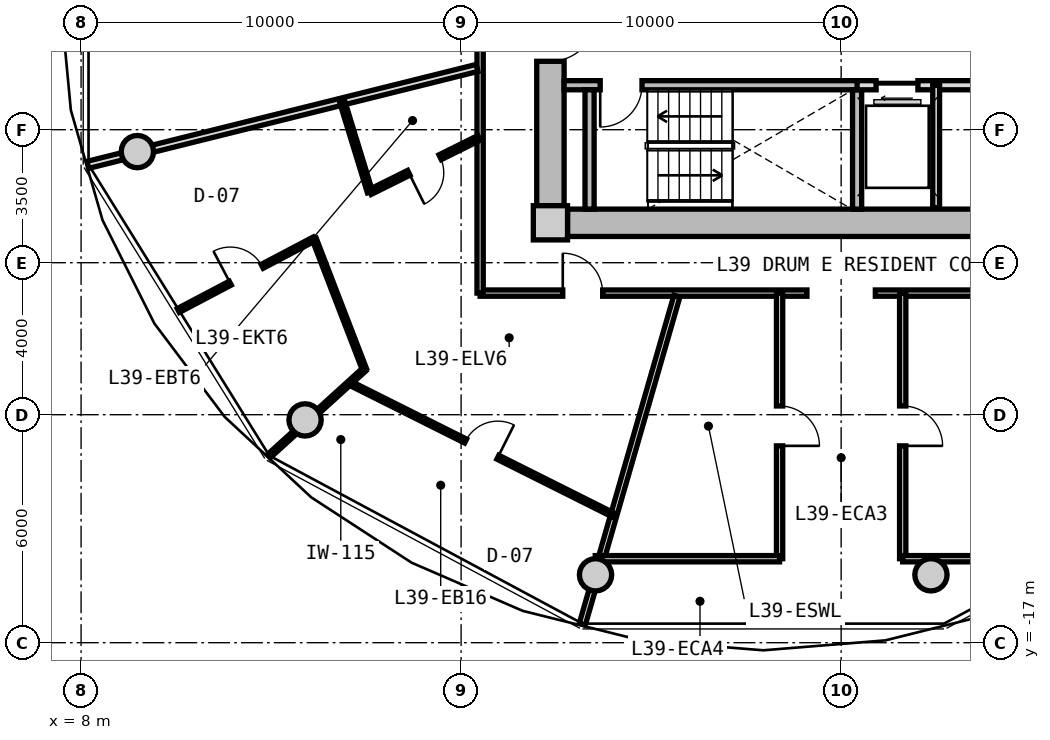
"""IFC4 building model, lengths in metres.
Left out: names, types, materials, properties, quantities, classifications, styles, units other than length and angle.
Written with IfcOpenShell. Run it as: python <this file> out.ifc"""

import sys

from ifc_helpers import new_model, si_unit, direction, frame, frame_2d, origin, origin_2d, place, context, subcontext, project, spatial, rectangle, circle, extrude, source, transform, mapped, element, fill, save


model = new_model("IFC4")
c1 = context("Model", 3, precision=1e-05, world=origin(), true_north=direction((0.0, 1.0)))
c2 = subcontext(c1, "Body", "Model", "MODEL_VIEW")
j1 = project(units=[si_unit("LENGTHUNIT", "METRE"), si_unit("PLANEANGLEUNIT", "RADIAN")], contexts=[c1])
p1 = place(None, origin())
s1 = spatial("IfcSite", under=j1, at=p1, CompositionType="ELEMENT")
p2 = place(p1, origin())
s2 = spatial("IfcBuilding", under=s1, at=p2, CompositionType="ELEMENT")
p3 = place(p2, frame((0.0, 0.0, 126.75)))
s3 = spatial("IfcBuildingStorey", under=s2, at=p3, CompositionType="ELEMENT", Elevation=126.75)
m1 = source(origin(), c2, "Body", "SweptSolid", [
    extrude(rectangle(XDim=0.9, YDim=0.9, at=origin_2d()), origin(), (0.0, 0.0, 1.0), 3.05),
])
p4 = place(p3, frame((20.35, -5.95, 0.0), z_axis=(0.0, 0.0, 1.0), x_axis=(1.0, 0.0, 0.0)))
e1 = element("IfcColumn", 1, at=p4, inside=s3, PredefinedType="COLUMN", context=c2, shape_type="MappedRepresentation", body=[
    mapped(m1, transform((0.0, 0.0, 0.0), x_axis=(1.0, 0.0, 0.0), y_axis=(0.0, 1.0, 0.0), z_axis=(0.0, 0.0, 1.0), scale=1.0)),
])
m2 = source(origin(), c2, "Body", "SweptSolid", [
    extrude(rectangle(XDim=14.4, YDim=0.72, at=frame_2d((7.2, 0.0))), origin(), (0.0, 0.0, 1.0), 2.73),
])
p5 = place(p3, frame((35.2, -5.95, 0.0), z_axis=(0.0, 0.0, 1.0), x_axis=(-1.0, 0.0, 0.0)))
e2 = element("IfcWall", 2, at=p5, inside=s3, PredefinedType="SHEAR", context=c2, shape_type="MappedRepresentation", body=[
    mapped(m2, transform((0.0, 0.0, 0.0), x_axis=(1.0, 0.0, 0.0), y_axis=(0.0, 1.0, 0.0), z_axis=(0.0, 0.0, 1.0), scale=1.0)),
])
m3 = source(origin(), c2, "Body", "SweptSolid", [
    extrude(rectangle(XDim=11.0, YDim=0.72, at=frame_2d((5.5, 0.0))), origin(), (0.0, 0.0, 1.0), 2.73),
])
p6 = place(p3, frame((20.35, -5.5, 0.0), z_axis=(0.0, 0.0, 1.0), x_axis=(0.0, 1.0, 0.0)))
e3 = element("IfcWall", 3, at=p6, inside=s3, PredefinedType="SHEAR", context=c2, shape_type="MappedRepresentation", body=[
    mapped(m3, transform((0.0, 0.0, 0.0), x_axis=(1.0, 0.0, 0.0), y_axis=(0.0, 1.0, 0.0), z_axis=(0.0, 0.0, 1.0), scale=1.0)),
])
p7 = place(p6, frame((3.8, 0.0, 0.0)))
e4 = element("IfcOpeningElement", 4, at=p7, cuts=e3, PredefinedType="OPENING", context=c2, shape_type="SweptSolid", body=[
    extrude(rectangle(XDim=1.2, YDim=2.15, at=frame_2d((0.6, 1.075))), frame((0.0, 0.37, 0.0), z_axis=(0.0, -1.0, 0.0), x_axis=(1.0, 0.0, 0.0)), (0.0, 0.0, 1.0), 0.74),
])
m4 = source(origin(), c2, "Body", "SweptSolid", [
    extrude(circle(Radius=0.425, at=origin_2d()), origin(), (0.0, 0.0, 1.0), 3.05),
])
for number, where, z_axis, x_axis in (
    (5, (9.481, -4.076, 0.0), (0.0, 0.0, 1.0), (1.0, 0.0, 0.0)),
    (6, (13.894, -11.137, 0.0), (0.0, 0.0, 1.0), (1.0, 0.0, 0.0)),
    (7, (21.537, -15.213, 0.0), (0.0, 0.0, 1.0), (1.0, 0.0, 0.0)),
    (8, (30.363, -15.213, 0.0), (0.0, 0.0, 1.0), (1.0, 0.0, 0.0)),
):
    element("IfcColumn", number, at=place(p3, frame(where, z_axis=z_axis, x_axis=x_axis)), inside=s3, PredefinedType="COLUMN", context=c2, shape_type="MappedRepresentation", body=[
        mapped(m4, transform((0.0, 0.0, 0.0), x_axis=(1.0, 0.0, 0.0), y_axis=(0.0, 1.0, 0.0), z_axis=(0.0, 0.0, 1.0), scale=1.0)),
    ])
m5 = source(origin(), c2, "Body", "SweptSolid", [
    extrude(rectangle(XDim=7.83, YDim=0.24, at=frame_2d((3.915, 0.0))), origin(), (0.0, 0.0, 1.0), 2.73),
])
p8 = place(p3, frame((20.71, -2.33, 0.0), z_axis=(0.0, 0.0, 1.0), x_axis=(1.0, 0.0, 0.0)))
e9 = element("IfcWall", 9, at=p8, inside=s3, PredefinedType="PARTITIONING", context=c2, shape_type="MappedRepresentation", body=[
    mapped(m5, transform((0.0, 0.0, 0.0), x_axis=(1.0, 0.0, 0.0), y_axis=(0.0, 1.0, 0.0), z_axis=(0.0, 0.0, 1.0), scale=1.0)),
])
p9 = place(p8, frame((0.95, 0.0, 0.0)))
e10 = element("IfcOpeningElement", 10, at=p9, cuts=e9, PredefinedType="OPENING", context=c2, shape_type="SweptSolid", body=[
    extrude(rectangle(XDim=1.1, YDim=2.15, at=frame_2d((0.55, 1.075))), frame((0.0, 0.13, 0.0), z_axis=(0.0, -1.0, 0.0), x_axis=(1.0, 0.0, 0.0)), (0.0, 0.0, 1.0), 0.26),
])
m6 = source(origin(), c2, "Body", "SweptSolid", [
    extrude(rectangle(XDim=3.14, YDim=0.24, at=frame_2d((1.57, 0.0))), origin(), (0.0, 0.0, 1.0), 2.73),
])
for number, where, z_axis, x_axis in (
    (11, (21.38, -5.59, 0.0), (0.0, 0.0, 1.0), (0.0, 1.0, 0.0)),
    (12, (28.42, -5.59, 0.0), (0.0, 0.0, 1.0), (0.0, 1.0, 0.0)),
):
    element("IfcWall", number, at=place(p3, frame(where, z_axis=z_axis, x_axis=x_axis)), inside=s3, PredefinedType="PARTITIONING", context=c2, shape_type="MappedRepresentation", body=[
        mapped(m6, transform((0.0, 0.0, 0.0), x_axis=(1.0, 0.0, 0.0), y_axis=(0.0, 1.0, 0.0), z_axis=(0.0, 0.0, 1.0), scale=1.0)),
    ])
m7 = source(origin(), c2, "Body", "SweptSolid", [
    extrude(rectangle(XDim=4.13, YDim=0.24, at=frame_2d((2.065, 0.0))), origin(), (0.0, 0.0, 1.0), 2.715),
])
p10 = place(p3, frame((28.42, -2.33, 0.0), z_axis=(0.0, 0.0, 1.0), x_axis=(1.0, 0.0, 0.0)))
e13 = element("IfcWall", 13, at=p10, inside=s3, PredefinedType="PARTITIONING", context=c2, shape_type="MappedRepresentation", body=[
    mapped(m7, transform((0.0, 0.0, 0.0), x_axis=(1.0, 0.0, 0.0), y_axis=(0.0, 1.0, 0.0), z_axis=(0.0, 0.0, 1.0), scale=1.0)),
])
p11 = place(p10, frame((0.5, 0.0, 0.0)))
e14 = element("IfcOpeningElement", 14, at=p11, cuts=e13, PredefinedType="OPENING", context=c2, shape_type="SweptSolid", body=[
    extrude(rectangle(XDim=1.1, YDim=2.2, at=frame_2d((0.55, 1.1))), frame((0.0, 0.13, 0.0), z_axis=(0.0, -1.0, 0.0), x_axis=(1.0, 0.0, 0.0)), (0.0, 0.0, 1.0), 0.26),
])
m8 = source(origin(), c2, "Body", "SweptSolid", [
    extrude(rectangle(XDim=3.22, YDim=0.18, at=frame_2d((1.61, 0.0))), origin(), (0.0, 0.0, 1.0), 2.715),
])
p12 = place(p3, frame((30.5, -5.55, 0.0), z_axis=(0.0, 0.0, 1.0), x_axis=(0.0, 1.0, 0.0)))
e15 = element("IfcWall", 15, at=p12, inside=s3, PredefinedType="PARTITIONING", context=c2, shape_type="MappedRepresentation", body=[
    mapped(m8, transform((0.0, 0.0, 0.0), x_axis=(1.0, 0.0, 0.0), y_axis=(0.0, 1.0, 0.0), z_axis=(0.0, 0.0, 1.0), scale=1.0)),
])
m9 = source(origin(), c2, "Body", "SweptSolid", [
    extrude(rectangle(XDim=8.6, YDim=0.165, at=frame_2d((4.3, 0.0))), origin(), (0.0, 0.0, 1.0), 2.715),
])
p13 = place(p3, frame((37.5, -7.8, 0.0), z_axis=(0.0, 0.0, 1.0), x_axis=(-1.0, 0.0, 0.0)))
e16 = element("IfcWall", 16, at=p13, inside=s3, PredefinedType="PARTITIONING", context=c2, shape_type="MappedRepresentation", body=[
    mapped(m9, transform((0.0, 0.0, 0.0), x_axis=(1.0, 0.0, 0.0), y_axis=(0.0, 1.0, 0.0), z_axis=(0.0, 0.0, 1.0), scale=1.0)),
])
p14 = place(p3, frame((27.1, -7.8, 0.0), z_axis=(0.0, 0.0, 1.0), x_axis=(-1.0, 0.0, 0.0)))
e17 = element("IfcWall", 17, at=p14, inside=s3, PredefinedType="PARTITIONING", context=c2, shape_type="MappedRepresentation", body=[
    mapped(m9, transform((0.0, 0.0, 0.0), x_axis=(1.0, 0.0, 0.0), y_axis=(0.0, 1.0, 0.0), z_axis=(0.0, 0.0, 1.0), scale=1.0)),
])
p15 = place(p14, frame((5.375, 0.0, 0.0)))
e18 = element("IfcOpeningElement", 18, at=p15, cuts=e17, PredefinedType="OPENING", context=c2, shape_type="SweptSolid", body=[
    extrude(rectangle(XDim=1.05, YDim=2.15, at=frame_2d((0.525, 1.075))), frame((0.0, 0.093, 0.0), z_axis=(0.0, -1.0, 0.0), x_axis=(1.0, 0.0, 0.0)), (0.0, 0.0, 1.0), 0.185),
])
m10 = source(origin(), c2, "Body", "SweptSolid", [
    extrude(rectangle(XDim=15.6, YDim=0.165, at=frame_2d((7.8, 0.0))), origin(), (0.0, 0.0, 1.0), 2.715),
])
p16 = place(p3, frame((18.5, -7.8, 0.0), z_axis=(0.0, 0.0, 1.0), x_axis=(0.0, 1.0, 0.0)))
e19 = element("IfcWall", 19, at=p16, inside=s3, PredefinedType="PARTITIONING", context=c2, shape_type="MappedRepresentation", body=[
    mapped(m10, transform((0.0, 0.0, 0.0), x_axis=(1.0, 0.0, 0.0), y_axis=(0.0, 1.0, 0.0), z_axis=(0.0, 0.0, 1.0), scale=1.0)),
])
p17 = place(p16, frame((10.383, 0.0, 0.0)))
e20 = element("IfcOpeningElement", 20, at=p17, cuts=e19, PredefinedType="OPENING", context=c2, shape_type="SweptSolid", body=[
    extrude(rectangle(XDim=1.05, YDim=2.15, at=frame_2d((0.525, 1.075))), frame((0.0, 0.093, 0.0), z_axis=(0.0, -1.0, 0.0), x_axis=(1.0, 0.0, 0.0)), (0.0, 0.0, 1.0), 0.185),
])
p18 = place(p16, frame((6.419, 0.0, 0.0)))
e21 = element("IfcOpeningElement", 21, at=p18, cuts=e19, PredefinedType="OPENING", context=c2, shape_type="SweptSolid", body=[
    extrude(rectangle(XDim=1.05, YDim=2.15, at=frame_2d((0.525, 1.075))), frame((0.0, 0.093, 0.0), z_axis=(0.0, -1.0, 0.0), x_axis=(1.0, 0.0, 0.0)), (0.0, 0.0, 1.0), 0.185),
])
m11 = source(origin(), c2, "Body", "SweptSolid", [
    extrude(rectangle(XDim=8.989, YDim=0.165, at=frame_2d((4.495, 0.0))), origin(), (0.0, 0.0, 1.0), 2.215),
])
p19 = place(p3, frame((23.678, -7.88, 0.0), z_axis=(0.0, 0.0, 1.0), x_axis=(-0.27702323008, -0.960863221274, 0.0)))
e22 = element("IfcWall", 22, at=p19, inside=s3, PredefinedType="PARTITIONING", context=c2, shape_type="MappedRepresentation", body=[
    mapped(m11, transform((0.0, 0.0, 0.0), x_axis=(1.0, 0.0, 0.0), y_axis=(0.0, 1.0, 0.0), z_axis=(0.0, 0.0, 1.0), scale=1.0)),
])
m12 = source(origin(), c2, "Body", "SweptSolid", [
    extrude(rectangle(XDim=6.99, YDim=0.165, at=frame_2d((3.495, 0.0))), origin(), (0.0, 0.0, 1.0), 2.715),
])
p20 = place(p3, frame((26.38, -14.79, 0.0), z_axis=(0.0, 0.0, 1.0), x_axis=(0.0, 1.0, 0.0)))
e23 = element("IfcWall", 23, at=p20, inside=s3, PredefinedType="PARTITIONING", context=c2, shape_type="MappedRepresentation", body=[
    mapped(m12, transform((0.0, 0.0, 0.0), x_axis=(1.0, 0.0, 0.0), y_axis=(0.0, 1.0, 0.0), z_axis=(0.0, 0.0, 1.0), scale=1.0)),
])
p21 = place(p20, frame((2.97, 0.0, 0.0)))
e24 = element("IfcOpeningElement", 24, at=p21, cuts=e23, PredefinedType="OPENING", context=c2, shape_type="SweptSolid", body=[
    extrude(rectangle(XDim=1.05, YDim=2.15, at=frame_2d((0.525, 1.075))), frame((0.0, 0.093, 0.0), z_axis=(0.0, -1.0, 0.0), x_axis=(1.0, 0.0, 0.0)), (0.0, 0.0, 1.0), 0.185),
])
m13 = source(origin(), c2, "Body", "SweptSolid", [
    extrude(rectangle(XDim=4.851, YDim=0.165, at=frame_2d((2.425, 0.0))), origin(), (0.0, 0.0, 1.0), 2.715),
])
p22 = place(p3, frame((21.529, -14.79, 0.0), z_axis=(0.0, 0.0, 1.0), x_axis=(1.0, 0.0, 0.0)))
e25 = element("IfcWall", 25, at=p22, inside=s3, PredefinedType="PARTITIONING", context=c2, shape_type="MappedRepresentation", body=[
    mapped(m13, transform((0.0, 0.0, 0.0), x_axis=(1.0, 0.0, 0.0), y_axis=(0.0, 1.0, 0.0), z_axis=(0.0, 0.0, 1.0), scale=1.0)),
])
m14 = source(origin(), c2, "Body", "SweptSolid", [
    extrude(rectangle(XDim=6.99, YDim=0.165, at=frame_2d((3.495, 0.0))), origin(), (0.0, 0.0, 1.0), 2.215),
])
p23 = place(p3, frame((29.62, -14.79, 0.0), z_axis=(0.0, 0.0, 1.0), x_axis=(0.0, 1.0, 0.0)))
e26 = element("IfcWall", 26, at=p23, inside=s3, PredefinedType="PARTITIONING", context=c2, shape_type="MappedRepresentation", body=[
    mapped(m14, transform((0.0, 0.0, 0.0), x_axis=(1.0, 0.0, 0.0), y_axis=(0.0, 1.0, 0.0), z_axis=(0.0, 0.0, 1.0), scale=1.0)),
])
p24 = place(p23, frame((2.97, 0.0, 0.0)))
e27 = element("IfcOpeningElement", 27, at=p24, cuts=e26, PredefinedType="OPENING", context=c2, shape_type="SweptSolid", body=[
    extrude(rectangle(XDim=1.05, YDim=2.15, at=frame_2d((0.525, 1.075))), frame((0.0, 0.093, 0.0), z_axis=(0.0, -1.0, 0.0), x_axis=(1.0, 0.0, 0.0)), (0.0, 0.0, 1.0), 0.185),
])
m15 = source(origin(), c2, "Body", "SweptSolid", [
    extrude(rectangle(XDim=4.569, YDim=0.165, at=frame_2d((2.285, 0.0))), origin(), (0.0, 0.0, 1.0), 2.715),
])
p25 = place(p3, frame((29.62, -14.79, 0.0), z_axis=(0.0, 0.0, 1.0), x_axis=(1.0, 0.0, 0.0)))
e28 = element("IfcWall", 28, at=p25, inside=s3, PredefinedType="PARTITIONING", context=c2, shape_type="MappedRepresentation", body=[
    mapped(m15, transform((0.0, 0.0, 0.0), x_axis=(1.0, 0.0, 0.0), y_axis=(0.0, 1.0, 0.0), z_axis=(0.0, 0.0, 1.0), scale=1.0)),
])
m16 = source(origin(), c2, "Body", "SweptSolid", [
    extrude(rectangle(XDim=10.556, YDim=0.19, at=frame_2d((5.278, 0.0))), origin(), (0.0, 0.0, 1.0), 2.215),
])
p26 = place(p3, frame((18.42, -1.875, 0.0), z_axis=(0.0, 0.0, 1.0), x_axis=(-0.970363857851, -0.241648470667, 0.0)))
e29 = element("IfcWall", 29, at=p26, inside=s3, PredefinedType="PARTITIONING", context=c2, shape_type="MappedRepresentation", body=[
    mapped(m16, transform((0.0, 0.0, 0.0), x_axis=(1.0, 0.0, 0.0), y_axis=(0.0, 1.0, 0.0), z_axis=(0.0, 0.0, 1.0), scale=1.0)),
])
m17 = source(origin(), c2, "Body", "SweptSolid", [
    extrude(rectangle(XDim=7.767, YDim=0.115, at=frame_2d((3.884, 0.0))), origin(), (0.0, 0.0, 1.0), 2.715),
])
p27 = place(p3, frame((15.07, -10.167, 0.0), z_axis=(0.0, 0.0, 1.0), x_axis=(0.894188177352, -0.447691303783, 0.0)))
e30 = element("IfcWall", 30, at=p27, inside=s3, PredefinedType="PARTITIONING", context=c2, shape_type="MappedRepresentation", body=[
    mapped(m17, transform((0.0, 0.0, 0.0), x_axis=(1.0, 0.0, 0.0), y_axis=(0.0, 1.0, 0.0), z_axis=(0.0, 0.0, 1.0), scale=1.0)),
])
p28 = place(p27, frame((3.409, 0.0, 0.0)))
e31 = element("IfcOpeningElement", 31, at=p28, cuts=e30, PredefinedType="OPENING", context=c2, shape_type="SweptSolid", body=[
    extrude(rectangle(XDim=0.95, YDim=2.1, at=frame_2d((0.475, 1.05))), frame((0.0, 0.067, 0.0), z_axis=(0.0, -1.0, 0.0), x_axis=(1.0, 0.0, 0.0)), (0.0, 0.0, 1.0), 0.135),
])
m18 = source(origin(), c2, "Body", "SweptSolid", [
    extrude(rectangle(XDim=3.393, YDim=0.115, at=frame_2d((1.696, 0.0))), origin(), (0.0, 0.0, 1.0), 2.215),
])
p29 = place(p3, frame((15.451, -9.811, 0.0), z_axis=(0.0, 0.0, 1.0), x_axis=(-0.740356690907, -0.672214229416, 0.0)))
e32 = element("IfcWall", 32, at=p29, inside=s3, PredefinedType="PARTITIONING", context=c2, shape_type="MappedRepresentation", body=[
    mapped(m18, transform((0.0, 0.0, 0.0), x_axis=(1.0, 0.0, 0.0), y_axis=(0.0, 1.0, 0.0), z_axis=(0.0, 0.0, 1.0), scale=1.0)),
])
m19 = source(origin(), c2, "Body", "SweptSolid", [
    extrude(rectangle(XDim=3.203, YDim=0.14, at=frame_2d((1.601, 0.0))), origin(), (0.0, 0.0, 1.0), 2.715),
])
p30 = place(p3, frame((18.47, -3.717, 0.0), z_axis=(0.0, 0.0, 1.0), x_axis=(-0.895552551978, -0.444955758077, 0.0)))
e33 = element("IfcWall", 33, at=p30, inside=s3, PredefinedType="PARTITIONING", context=c2, shape_type="MappedRepresentation", body=[
    mapped(m19, transform((0.0, 0.0, 0.0), x_axis=(1.0, 0.0, 0.0), y_axis=(0.0, 1.0, 0.0), z_axis=(0.0, 0.0, 1.0), scale=1.0)),
])
p31 = place(p30, frame((1.141, 0.0, 0.0)))
e34 = element("IfcOpeningElement", 34, at=p31, cuts=e33, PredefinedType="OPENING", context=c2, shape_type="SweptSolid", body=[
    extrude(rectangle(XDim=0.92, YDim=2.1, at=frame_2d((0.46, 1.05))), frame((0.0, 0.08, 0.0), z_axis=(0.0, -1.0, 0.0), x_axis=(1.0, 0.0, 0.0)), (0.0, 0.0, 1.0), 0.16),
])
m20 = source(origin(), c2, "Body", "SweptSolid", [
    extrude(rectangle(XDim=2.478, YDim=0.14, at=frame_2d((1.239, 0.0))), origin(), (0.0, 0.0, 1.0), 2.715),
])
p32 = place(p3, frame((15.602, -5.142, 0.0), z_axis=(0.0, 0.0, 1.0), x_axis=(-0.293372504398, 0.955998207981, 0.0)))
e35 = element("IfcWall", 35, at=p32, inside=s3, PredefinedType="PARTITIONING", context=c2, shape_type="MappedRepresentation", body=[
    mapped(m20, transform((0.0, 0.0, 0.0), x_axis=(1.0, 0.0, 0.0), y_axis=(0.0, 1.0, 0.0), z_axis=(0.0, 0.0, 1.0), scale=1.0)),
])
m21 = source(origin(), c2, "Body", "SweptSolid", [
    extrude(rectangle(XDim=4.042, YDim=0.115, at=frame_2d((2.021, 0.0))), origin(), (0.0, 0.0, 1.0), 2.715),
])
p33 = place(p3, frame((14.134, -6.375, 0.0), z_axis=(0.0, 0.0, 1.0), x_axis=(-0.88476748851, -0.466032714812, 0.0)))
e36 = element("IfcWall", 36, at=p33, inside=s3, PredefinedType="PARTITIONING", context=c2, shape_type="MappedRepresentation", body=[
    mapped(m21, transform((0.0, 0.0, 0.0), x_axis=(1.0, 0.0, 0.0), y_axis=(0.0, 1.0, 0.0), z_axis=(0.0, 0.0, 1.0), scale=1.0)),
])
p34 = place(p33, frame((1.546, 0.0, 0.0)))
e37 = element("IfcOpeningElement", 37, at=p34, cuts=e36, PredefinedType="OPENING", context=c2, shape_type="SweptSolid", body=[
    extrude(rectangle(XDim=0.95, YDim=2.1, at=frame_2d((0.475, 1.05))), frame((0.0, 0.067, 0.0), z_axis=(0.0, -1.0, 0.0), x_axis=(1.0, 0.0, 0.0)), (0.0, 0.0, 1.0), 0.135),
])
m22 = source(origin(), c2, "Body", "SweptSolid", [
    extrude(rectangle(XDim=3.677, YDim=0.115, at=frame_2d((1.838, 0.0))), origin(), (0.0, 0.0, 1.0), 2.715),
])
p35 = place(p3, frame((14.134, -6.375, 0.0), z_axis=(0.0, 0.0, 1.0), x_axis=(0.359592980271, -0.933109258629, 0.0)))
e38 = element("IfcWall", 38, at=p35, inside=s3, PredefinedType="PARTITIONING", context=c2, shape_type="MappedRepresentation", body=[
    mapped(m22, transform((0.0, 0.0, 0.0), x_axis=(1.0, 0.0, 0.0), y_axis=(0.0, 1.0, 0.0), z_axis=(0.0, 0.0, 1.0), scale=1.0)),
])
m23 = source(origin(), c2, "Body", "SweptSolid", [
    extrude(rectangle(XDim=1.1, YDim=2.15, at=frame_2d((0.55, 1.075))), frame((0.0, 0.025, 0.0), z_axis=(0.0, -1.0, 0.0), x_axis=(1.0, 0.0, 0.0)), (0.0, 0.0, 1.0), 0.05),
])
p36 = place(p9, frame((1.1, 0.0, 0.0), z_axis=(0.0, 0.0, 1.0), x_axis=(-1.0, 0.0, 0.0)))
e39 = element("IfcDoor", 39, at=p36, inside=s3, OperationType="SINGLE_SWING_RIGHT", PredefinedType="DOOR", context=c2, shape_type="MappedRepresentation", body=[
    mapped(m23, transform((0.0, 0.0, 0.0), x_axis=(1.0, 0.0, 0.0), y_axis=(0.0, 1.0, 0.0), z_axis=(0.0, 0.0, 1.0), scale=1.0)),
])
fill(e10, e39)
m24 = source(origin(), c2, "Body", "SweptSolid", [
    extrude(rectangle(XDim=1.2, YDim=2.15, at=frame_2d((0.6, 1.075))), frame((0.0, 0.025, 0.0), z_axis=(0.0, -1.0, 0.0), x_axis=(1.0, 0.0, 0.0)), (0.0, 0.0, 1.0), 0.05),
])
p37 = place(p7, frame((1.2, 0.0, 0.0), z_axis=(0.0, 0.0, 1.0), x_axis=(-1.0, 0.0, 0.0)))
e40 = element("IfcDoor", 40, at=p37, inside=s3, OperationType="SINGLE_SWING_LEFT", PredefinedType="DOOR", context=c2, shape_type="MappedRepresentation", body=[
    mapped(m24, transform((0.0, 0.0, 0.0), x_axis=(1.0, 0.0, 0.0), y_axis=(0.0, 1.0, 0.0), z_axis=(0.0, 0.0, 1.0), scale=1.0)),
])
fill(e4, e40)
m25 = source(origin(), c2, "Body", "SweptSolid", [
    extrude(rectangle(XDim=1.1, YDim=2.2, at=frame_2d((0.55, 1.1))), frame((0.0, 0.025, 0.0), z_axis=(0.0, -1.0, 0.0), x_axis=(1.0, 0.0, 0.0)), (0.0, 0.0, 1.0), 0.05),
])
p38 = place(p11, frame((1.1, 0.0, 0.0), z_axis=(0.0, 0.0, 1.0), x_axis=(-1.0, 0.0, 0.0)))
e41 = element("IfcDoor", 41, at=p38, inside=s3, OperationType="SLIDING_TO_LEFT", PredefinedType="DOOR", context=c2, shape_type="MappedRepresentation", body=[
    mapped(m25, transform((0.0, 0.0, 0.0), x_axis=(1.0, 0.0, 0.0), y_axis=(0.0, 1.0, 0.0), z_axis=(0.0, 0.0, 1.0), scale=1.0)),
])
fill(e14, e41)
m26 = source(origin(), c2, "Body", "SweptSolid", [
    extrude(rectangle(XDim=1.05, YDim=2.15, at=frame_2d((0.525, 1.075))), frame((0.0, 0.025, 0.0), z_axis=(0.0, -1.0, 0.0), x_axis=(1.0, 0.0, 0.0)), (0.0, 0.0, 1.0), 0.05),
])
p39 = place(p21, frame((1.05, 0.0, 0.0), z_axis=(0.0, 0.0, 1.0), x_axis=(-1.0, 0.0, 0.0)))
e42 = element("IfcDoor", 42, at=p39, inside=s3, OperationType="SINGLE_SWING_RIGHT", PredefinedType="DOOR", context=c2, shape_type="MappedRepresentation", body=[
    mapped(m26, transform((0.0, 0.0, 0.0), x_axis=(1.0, 0.0, 0.0), y_axis=(0.0, 1.0, 0.0), z_axis=(0.0, 0.0, 1.0), scale=1.0)),
])
fill(e24, e42)
p40 = place(p24, frame((1.05, 0.0, 0.0), z_axis=(0.0, 0.0, 1.0), x_axis=(-1.0, 0.0, 0.0)))
e43 = element("IfcDoor", 43, at=p40, inside=s3, OperationType="SINGLE_SWING_RIGHT", PredefinedType="DOOR", context=c2, shape_type="MappedRepresentation", body=[
    mapped(m26, transform((0.0, 0.0, 0.0), x_axis=(1.0, 0.0, 0.0), y_axis=(0.0, 1.0, 0.0), z_axis=(0.0, 0.0, 1.0), scale=1.0)),
])
fill(e27, e43)
p41 = place(p15, frame((1.05, 0.0, 0.0), z_axis=(0.0, 0.0, 1.0), x_axis=(-1.0, 0.0, 0.0)))
e44 = element("IfcDoor", 44, at=p41, inside=s3, OperationType="SINGLE_SWING_LEFT", PredefinedType="DOOR", context=c2, shape_type="MappedRepresentation", body=[
    mapped(m26, transform((0.0, 0.0, 0.0), x_axis=(1.0, 0.0, 0.0), y_axis=(0.0, 1.0, 0.0), z_axis=(0.0, 0.0, 1.0), scale=1.0)),
])
fill(e18, e44)
m27 = source(origin(), c2, "Body", "SweptSolid", [
    extrude(rectangle(XDim=0.92, YDim=2.1, at=frame_2d((0.46, 1.05))), frame((0.0, 0.025, 0.0), z_axis=(0.0, -1.0, 0.0), x_axis=(1.0, 0.0, 0.0)), (0.0, 0.0, 1.0), 0.05),
])
p42 = place(p31, origin())
e45 = element("IfcDoor", 45, at=p42, inside=s3, OperationType="SINGLE_SWING_RIGHT", PredefinedType="DOOR", context=c2, shape_type="MappedRepresentation", body=[
    mapped(m27, transform((0.0, 0.0, 0.0), x_axis=(1.0, 0.0, 0.0), y_axis=(0.0, 1.0, 0.0), z_axis=(0.0, 0.0, 1.0), scale=1.0)),
])
fill(e34, e45)
m28 = source(origin(), c2, "Body", "SweptSolid", [
    extrude(rectangle(XDim=0.95, YDim=2.1, at=frame_2d((0.475, 1.05))), frame((0.0, 0.025, 0.0), z_axis=(0.0, -1.0, 0.0), x_axis=(1.0, 0.0, 0.0)), (0.0, 0.0, 1.0), 0.05),
])
p43 = place(p34, frame((0.95, 0.0, 0.0), z_axis=(0.0, 0.0, 1.0), x_axis=(-1.0, 0.0, 0.0)))
e46 = element("IfcDoor", 46, at=p43, inside=s3, OperationType="SINGLE_SWING_LEFT", PredefinedType="DOOR", context=c2, shape_type="MappedRepresentation", body=[
    mapped(m28, transform((0.0, 0.0, 0.0), x_axis=(1.0, 0.0, 0.0), y_axis=(0.0, 1.0, 0.0), z_axis=(0.0, 0.0, 1.0), scale=1.0)),
])
fill(e37, e46)
p44 = place(p28, origin())
e47 = element("IfcDoor", 47, at=p44, inside=s3, OperationType="SINGLE_SWING_RIGHT", PredefinedType="DOOR", context=c2, shape_type="MappedRepresentation", body=[
    mapped(m28, transform((0.0, 0.0, 0.0), x_axis=(1.0, 0.0, 0.0), y_axis=(0.0, 1.0, 0.0), z_axis=(0.0, 0.0, 1.0), scale=1.0)),
])
fill(e31, e47)
save(model, sys.argv[1])
